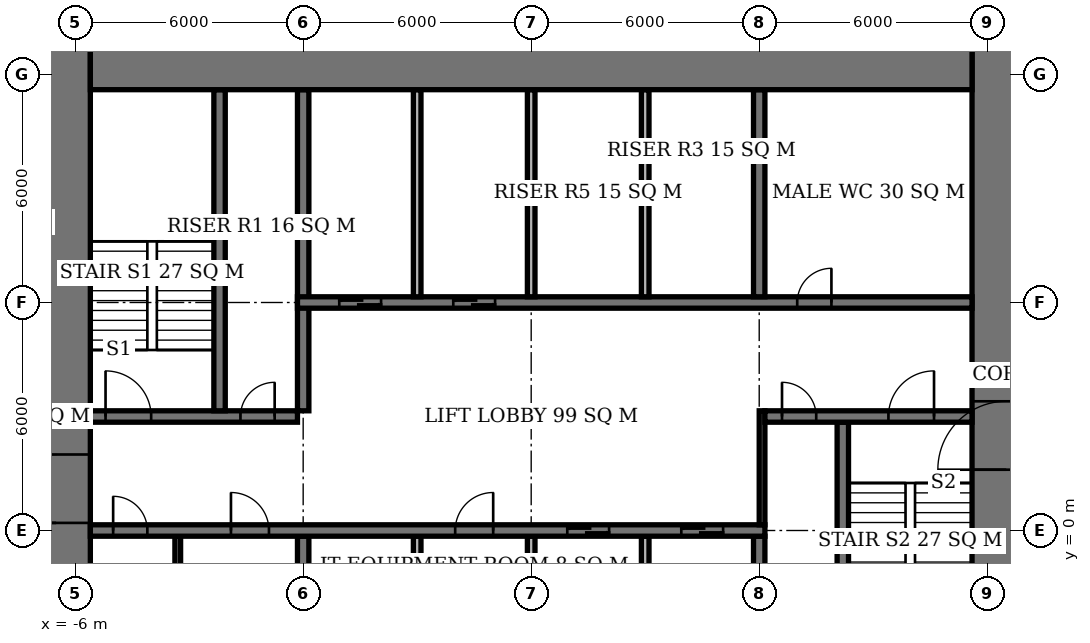
"""IFC4 building model, lengths in metres.
Left out: names, types, materials, properties, quantities, classifications, styles, units other than length and angle.
Written with IfcOpenShell. Run it as: python <this file> out.ifc"""

import sys

from ifc_helpers import new_model, si_unit, direction, frame, frame_2d, origin, place, context, subcontext, project, spatial, rectangle, extrude, element, fill, save


model = new_model("IFC4")
c1 = context("Model", 3, precision=1e-05, world=origin(), true_north=direction((0.0, 1.0)))
c2 = subcontext(c1, "Body", "Model", "MODEL_VIEW")
j1 = project(units=[si_unit("LENGTHUNIT", "METRE"), si_unit("PLANEANGLEUNIT", "RADIAN")], contexts=[c1])
p1 = place(None, origin())
s1 = spatial("IfcSite", under=j1, at=p1, CompositionType="ELEMENT")
p2 = place(p1, origin())
s2 = spatial("IfcBuilding", under=s1, at=p2, CompositionType="ELEMENT")
p3 = place(p2, frame((0.0, 0.0, 268.4)))
s3 = spatial("IfcBuildingStorey", under=s2, at=p3, CompositionType="ELEMENT", Elevation=268.4)
p4 = place(p3, frame((-5.6, 12.6, 0.0), z_axis=(0.0, 0.0, 1.0), x_axis=(1.0, 0.0, 0.0)))
e1 = element("IfcWall", 1, at=p4, inside=s3, PredefinedType="SHEAR", context=c2, shape_type="SweptSolid", body=[
    extrude(rectangle(XDim=23.2, YDim=2.0, at=frame_2d((11.6, 0.0))), origin(), (0.0, 0.0, 1.0), 3.9),
])
p5 = place(p3, frame((-6.5, -7.6, 0.0), z_axis=(0.0, 0.0, 1.0), x_axis=(0.0, 1.0, 0.0)))
e2 = element("IfcWall", 2, at=p5, inside=s3, PredefinedType="SHEAR", context=c2, shape_type="SweptSolid", body=[
    extrude(rectangle(XDim=21.2, YDim=1.8, at=frame_2d((10.6, 0.0))), origin(), (0.0, 0.0, 1.0), 3.9),
])
p6 = place(p5, frame((7.8, 0.0, 0.0)))
e3 = element("IfcOpeningElement", 3, at=p6, cuts=e2, PredefinedType="OPENING", context=c2, shape_type="SweptSolid", body=[
    extrude(rectangle(XDim=1.8, YDim=2.4, at=frame_2d((0.9, 1.2))), frame((0.0, 0.91, 0.0), z_axis=(0.0, -1.0, 0.0), x_axis=(1.0, 0.0, 0.0)), (0.0, 0.0, 1.0), 1.82),
])
p7 = place(p3, frame((18.5, -7.6, 0.0), z_axis=(0.0, 0.0, 1.0), x_axis=(0.0, 1.0, 0.0)))
e4 = element("IfcWall", 4, at=p7, inside=s3, PredefinedType="SHEAR", context=c2, shape_type="SweptSolid", body=[
    extrude(rectangle(XDim=21.2, YDim=1.8, at=frame_2d((10.6, 0.0))), origin(), (0.0, 0.0, 1.0), 3.9),
])
p8 = place(p7, frame((9.2, 0.0, 0.0)))
e5 = element("IfcOpeningElement", 5, at=p8, cuts=e4, PredefinedType="OPENING", context=c2, shape_type="SweptSolid", body=[
    extrude(rectangle(XDim=1.8, YDim=2.4, at=frame_2d((0.9, 1.2))), frame((0.0, 0.91, 0.0), z_axis=(0.0, -1.0, 0.0), x_axis=(1.0, 0.0, 0.0)), (0.0, 0.0, 1.0), 1.82),
])
p9 = place(p3, frame((-5.6, 0.0, 0.0), z_axis=(0.0, 0.0, 1.0), x_axis=(1.0, 0.0, 0.0)))
e6 = element("IfcWall", 6, at=p9, inside=s3, PredefinedType="SHEAR", context=c2, shape_type="SweptSolid", body=[
    extrude(rectangle(XDim=17.75, YDim=0.3, at=frame_2d((8.875, 0.0))), origin(), (0.0, 0.0, 1.0), 3.9),
])
p10 = place(p9, frame((0.6, 0.0, 0.0)))
e7 = element("IfcOpeningElement", 7, at=p10, cuts=e6, PredefinedType="OPENING", context=c2, shape_type="SweptSolid", body=[
    extrude(rectangle(XDim=0.9, YDim=2.1, at=frame_2d((0.45, 1.05))), frame((0.0, 0.16, 0.0), z_axis=(0.0, -1.0, 0.0), x_axis=(1.0, 0.0, 0.0)), (0.0, 0.0, 1.0), 0.32),
])
p11 = place(p9, frame((3.7, 0.0, 0.0)))
e8 = element("IfcOpeningElement", 8, at=p11, cuts=e6, PredefinedType="OPENING", context=c2, shape_type="SweptSolid", body=[
    extrude(rectangle(XDim=1.0, YDim=2.1, at=frame_2d((0.5, 1.05))), frame((0.0, 0.16, 0.0), z_axis=(0.0, -1.0, 0.0), x_axis=(1.0, 0.0, 0.0)), (0.0, 0.0, 1.0), 0.32),
])
p12 = place(p9, frame((9.6, 0.0, 0.0)))
e9 = element("IfcOpeningElement", 9, at=p12, cuts=e6, PredefinedType="OPENING", context=c2, shape_type="SweptSolid", body=[
    extrude(rectangle(XDim=1.0, YDim=2.1, at=frame_2d((0.5, 1.05))), frame((0.0, 0.16, 0.0), z_axis=(0.0, -1.0, 0.0), x_axis=(1.0, 0.0, 0.0)), (0.0, 0.0, 1.0), 0.32),
])
p13 = place(p9, frame((12.55, 0.0, 0.0)))
e10 = element("IfcOpeningElement", 10, at=p13, cuts=e6, PredefinedType="OPENING", context=c2, shape_type="SweptSolid", body=[
    extrude(rectangle(XDim=1.1, YDim=2.1, at=frame_2d((0.55, 1.05))), frame((0.0, 0.16, 0.0), z_axis=(0.0, -1.0, 0.0), x_axis=(1.0, 0.0, 0.0)), (0.0, 0.0, 1.0), 0.32),
])
p14 = place(p9, frame((15.55, 0.0, 0.0)))
e11 = element("IfcOpeningElement", 11, at=p14, cuts=e6, PredefinedType="OPENING", context=c2, shape_type="SweptSolid", body=[
    extrude(rectangle(XDim=1.1, YDim=2.1, at=frame_2d((0.55, 1.05))), frame((0.0, 0.16, 0.0), z_axis=(0.0, -1.0, 0.0), x_axis=(1.0, 0.0, 0.0)), (0.0, 0.0, 1.0), 0.32),
])
p15 = place(p3, frame((-5.6, 3.0, 0.0), z_axis=(0.0, 0.0, 1.0), x_axis=(1.0, 0.0, 0.0)))
e12 = element("IfcWall", 12, at=p15, inside=s3, PredefinedType="SHEAR", context=c2, shape_type="SweptSolid", body=[
    extrude(rectangle(XDim=5.45, YDim=0.3, at=frame_2d((2.725, 0.0))), origin(), (0.0, 0.0, 1.0), 3.9),
])
p16 = place(p15, frame((0.4, 0.0, 0.0)))
e13 = element("IfcOpeningElement", 13, at=p16, cuts=e12, PredefinedType="OPENING", context=c2, shape_type="SweptSolid", body=[
    extrude(rectangle(XDim=1.2, YDim=2.1, at=frame_2d((0.6, 1.05))), frame((0.0, 0.16, 0.0), z_axis=(0.0, -1.0, 0.0), x_axis=(1.0, 0.0, 0.0)), (0.0, 0.0, 1.0), 0.32),
])
p17 = place(p15, frame((3.95, 0.0, 0.0)))
e14 = element("IfcOpeningElement", 14, at=p17, cuts=e12, PredefinedType="OPENING", context=c2, shape_type="SweptSolid", body=[
    extrude(rectangle(XDim=0.9, YDim=2.1, at=frame_2d((0.45, 1.05))), frame((0.0, 0.16, 0.0), z_axis=(0.0, -1.0, 0.0), x_axis=(1.0, 0.0, 0.0)), (0.0, 0.0, 1.0), 0.32),
])
p18 = place(p3, frame((12.15, 3.0, 0.0), z_axis=(0.0, 0.0, 1.0), x_axis=(1.0, 0.0, 0.0)))
e15 = element("IfcWall", 15, at=p18, inside=s3, PredefinedType="SHEAR", context=c2, shape_type="SweptSolid", body=[
    extrude(rectangle(XDim=5.45, YDim=0.3, at=frame_2d((2.725, 0.0))), origin(), (0.0, 0.0, 1.0), 3.9),
])
p19 = place(p18, frame((3.25, 0.0, 0.0)))
e16 = element("IfcOpeningElement", 16, at=p19, cuts=e15, PredefinedType="OPENING", context=c2, shape_type="SweptSolid", body=[
    extrude(rectangle(XDim=1.2, YDim=2.1, at=frame_2d((0.6, 1.05))), frame((0.0, 0.16, 0.0), z_axis=(0.0, -1.0, 0.0), x_axis=(1.0, 0.0, 0.0)), (0.0, 0.0, 1.0), 0.32),
])
p20 = place(p18, frame((0.45, 0.0, 0.0)))
e17 = element("IfcOpeningElement", 17, at=p20, cuts=e15, PredefinedType="OPENING", context=c2, shape_type="SweptSolid", body=[
    extrude(rectangle(XDim=0.9, YDim=2.1, at=frame_2d((0.45, 1.05))), frame((0.0, 0.16, 0.0), z_axis=(0.0, -1.0, 0.0), x_axis=(1.0, 0.0, 0.0)), (0.0, 0.0, 1.0), 0.32),
])
p21 = place(p3, frame((-0.15, 6.0, 0.0), z_axis=(0.0, 0.0, 1.0), x_axis=(1.0, 0.0, 0.0)))
e18 = element("IfcWall", 18, at=p21, inside=s3, PredefinedType="SHEAR", context=c2, shape_type="SweptSolid", body=[
    extrude(rectangle(XDim=17.75, YDim=0.3, at=frame_2d((8.875, 0.0))), origin(), (0.0, 0.0, 1.0), 3.9),
])
p22 = place(p21, frame((13.15, 0.0, 0.0)))
e19 = element("IfcOpeningElement", 19, at=p22, cuts=e18, PredefinedType="OPENING", context=c2, shape_type="SweptSolid", body=[
    extrude(rectangle(XDim=0.9, YDim=2.1, at=frame_2d((0.45, 1.05))), frame((0.0, 0.16, 0.0), z_axis=(0.0, -1.0, 0.0), x_axis=(1.0, 0.0, 0.0)), (0.0, 0.0, 1.0), 0.32),
])
p23 = place(p21, frame((1.1, 0.0, 0.0)))
e20 = element("IfcOpeningElement", 20, at=p23, cuts=e18, PredefinedType="OPENING", context=c2, shape_type="SweptSolid", body=[
    extrude(rectangle(XDim=1.1, YDim=2.1, at=frame_2d((0.55, 1.05))), frame((0.0, 0.16, 0.0), z_axis=(0.0, -1.0, 0.0), x_axis=(1.0, 0.0, 0.0)), (0.0, 0.0, 1.0), 0.32),
])
p24 = place(p21, frame((4.1, 0.0, 0.0)))
e21 = element("IfcOpeningElement", 21, at=p24, cuts=e18, PredefinedType="OPENING", context=c2, shape_type="SweptSolid", body=[
    extrude(rectangle(XDim=1.1, YDim=2.1, at=frame_2d((0.55, 1.05))), frame((0.0, 0.16, 0.0), z_axis=(0.0, -1.0, 0.0), x_axis=(1.0, 0.0, 0.0)), (0.0, 0.0, 1.0), 0.32),
])
p25 = place(p3, frame((0.0, -5.6, 0.0), z_axis=(0.0, 0.0, 1.0), x_axis=(0.0, 1.0, 0.0)))
e22 = element("IfcWall", 22, at=p25, inside=s3, PredefinedType="SHEAR", context=c2, shape_type="SweptSolid", body=[
    extrude(rectangle(XDim=5.45, YDim=0.3, at=frame_2d((2.725, 0.0))), origin(), (0.0, 0.0, 1.0), 3.9),
])
p26 = place(p3, frame((0.0, 3.15, 0.0), z_axis=(0.0, 0.0, 1.0), x_axis=(0.0, 1.0, 0.0)))
e23 = element("IfcWall", 23, at=p26, inside=s3, PredefinedType="SHEAR", context=c2, shape_type="SweptSolid", body=[
    extrude(rectangle(XDim=8.45, YDim=0.3, at=frame_2d((4.225, 0.0))), origin(), (0.0, 0.0, 1.0), 3.9),
])
for number, where, z_axis, x_axis in (
    (24, (12.0, -5.6, 0.0), (0.0, 0.0, 1.0), (0.0, 1.0, 0.0)),
    (25, (12.0, 6.15, 0.0), (0.0, 0.0, 1.0), (0.0, 1.0, 0.0)),
):
    element("IfcWall", number, at=place(p3, frame(where, z_axis=z_axis, x_axis=x_axis)), inside=s3, PredefinedType="SHEAR", context=c2, shape_type="SweptSolid", body=[
        extrude(rectangle(XDim=5.45, YDim=0.3, at=frame_2d((2.725, 0.0))), origin(), (0.0, 0.0, 1.0), 3.9),
    ])
for number, where, z_axis, x_axis in (
    (26, (-2.2, 3.15, 0.0), (0.0, 0.0, 1.0), (0.0, 1.0, 0.0)),
    (27, (14.2, -5.6, 0.0), (0.0, 0.0, 1.0), (0.0, 1.0, 0.0)),
):
    element("IfcWall", number, at=place(p3, frame(where, z_axis=z_axis, x_axis=x_axis)), inside=s3, PredefinedType="SHEAR", context=c2, shape_type="SweptSolid", body=[
        extrude(rectangle(XDim=8.45, YDim=0.3, at=frame_2d((4.225, 0.0))), origin(), (0.0, 0.0, 1.0), 3.9),
    ])
for number, where, z_axis, x_axis in (
    (28, (3.0, 6.15, 0.0), (0.0, 0.0, 1.0), (0.0, 1.0, 0.0)),
    (29, (6.0, 6.15, 0.0), (0.0, 0.0, 1.0), (0.0, 1.0, 0.0)),
    (30, (9.0, 6.15, 0.0), (0.0, 0.0, 1.0), (0.0, 1.0, 0.0)),
    (31, (3.0, -5.6, 0.0), (0.0, 0.0, 1.0), (0.0, 1.0, 0.0)),
    (32, (6.0, -5.6, 0.0), (0.0, 0.0, 1.0), (0.0, 1.0, 0.0)),
    (33, (9.0, -5.6, 0.0), (0.0, 0.0, 1.0), (0.0, 1.0, 0.0)),
):
    element("IfcWall", number, at=place(p3, frame(where, z_axis=z_axis, x_axis=x_axis)), inside=s3, PredefinedType="SOLIDWALL", context=c2, shape_type="SweptSolid", body=[
        extrude(rectangle(XDim=5.45, YDim=0.2, at=frame_2d((2.725, 0.0))), origin(), (0.0, 0.0, 1.0), 3.9),
    ])
p27 = place(p3, frame((-3.3, -5.6, 0.0), z_axis=(0.0, 0.0, 1.0), x_axis=(0.0, 1.0, 0.0)))
e34 = element("IfcWall", 34, at=p27, inside=s3, PredefinedType="PLUMBINGWALL", context=c2, shape_type="SweptSolid", body=[
    extrude(rectangle(XDim=5.45, YDim=0.15, at=frame_2d((2.725, 0.0))), origin(), (0.0, 0.0, 1.0), 3.65),
])
p28 = place(p3, frame((12.075, 0.15, 0.0), z_axis=(0.0, 0.0, 1.0), x_axis=(0.0, 1.0, 0.0)))
e35 = element("IfcWall", 35, at=p28, inside=s3, PredefinedType="PARTITIONING", context=c2, shape_type="SweptSolid", body=[
    extrude(rectangle(XDim=3.0, YDim=0.15, at=frame_2d((1.5, 0.0))), origin(), (0.0, 0.0, 1.0), 3.65),
])
p29 = place(p6, origin())
e36 = element("IfcDoor", 36, at=p29, inside=s3, OperationType="DOUBLE_DOOR_SINGLE_SWING", PredefinedType="DOOR", context=c2, shape_type="SweptSolid", body=[
    extrude(rectangle(XDim=1.8, YDim=2.4, at=frame_2d((0.9, 1.2))), frame((0.0, 0.025, 0.0), z_axis=(0.0, -1.0, 0.0), x_axis=(1.0, 0.0, 0.0)), (0.0, 0.0, 1.0), 0.05),
])
fill(e3, e36)
p30 = place(p8, origin())
e37 = element("IfcDoor", 37, at=p30, inside=s3, OperationType="DOUBLE_DOOR_SINGLE_SWING", PredefinedType="DOOR", context=c2, shape_type="SweptSolid", body=[
    extrude(rectangle(XDim=1.8, YDim=2.4, at=frame_2d((0.9, 1.2))), frame((0.0, 0.025, 0.0), z_axis=(0.0, -1.0, 0.0), x_axis=(1.0, 0.0, 0.0)), (0.0, 0.0, 1.0), 0.05),
])
fill(e5, e37)
p31 = place(p16, origin())
e38 = element("IfcDoor", 38, at=p31, inside=s3, OperationType="SINGLE_SWING_LEFT", PredefinedType="DOOR", context=c2, shape_type="SweptSolid", body=[
    extrude(rectangle(XDim=1.2, YDim=2.1, at=frame_2d((0.6, 1.05))), frame((0.0, 0.025, 0.0), z_axis=(0.0, -1.0, 0.0), x_axis=(1.0, 0.0, 0.0)), (0.0, 0.0, 1.0), 0.05),
])
fill(e13, e38)
p32 = place(p17, origin())
e39 = element("IfcDoor", 39, at=p32, inside=s3, OperationType="SINGLE_SWING_RIGHT", PredefinedType="DOOR", context=c2, shape_type="SweptSolid", body=[
    extrude(rectangle(XDim=0.9, YDim=2.1, at=frame_2d((0.45, 1.05))), frame((0.0, 0.025, 0.0), z_axis=(0.0, -1.0, 0.0), x_axis=(1.0, 0.0, 0.0)), (0.0, 0.0, 1.0), 0.05),
])
fill(e14, e39)
p33 = place(p19, origin())
e40 = element("IfcDoor", 40, at=p33, inside=s3, OperationType="SINGLE_SWING_RIGHT", PredefinedType="DOOR", context=c2, shape_type="SweptSolid", body=[
    extrude(rectangle(XDim=1.2, YDim=2.1, at=frame_2d((0.6, 1.05))), frame((0.0, 0.025, 0.0), z_axis=(0.0, -1.0, 0.0), x_axis=(1.0, 0.0, 0.0)), (0.0, 0.0, 1.0), 0.05),
])
fill(e16, e40)
p34 = place(p20, origin())
e41 = element("IfcDoor", 41, at=p34, inside=s3, OperationType="SINGLE_SWING_LEFT", PredefinedType="DOOR", context=c2, shape_type="SweptSolid", body=[
    extrude(rectangle(XDim=0.9, YDim=2.1, at=frame_2d((0.45, 1.05))), frame((0.0, 0.025, 0.0), z_axis=(0.0, -1.0, 0.0), x_axis=(1.0, 0.0, 0.0)), (0.0, 0.0, 1.0), 0.05),
])
fill(e17, e41)
p35 = place(p10, origin())
e42 = element("IfcDoor", 42, at=p35, inside=s3, OperationType="SINGLE_SWING_LEFT", PredefinedType="DOOR", context=c2, shape_type="SweptSolid", body=[
    extrude(rectangle(XDim=0.9, YDim=2.1, at=frame_2d((0.45, 1.05))), frame((0.0, 0.025, 0.0), z_axis=(0.0, -1.0, 0.0), x_axis=(1.0, 0.0, 0.0)), (0.0, 0.0, 1.0), 0.05),
])
fill(e7, e42)
p36 = place(p11, origin())
e43 = element("IfcDoor", 43, at=p36, inside=s3, OperationType="SINGLE_SWING_LEFT", PredefinedType="DOOR", context=c2, shape_type="SweptSolid", body=[
    extrude(rectangle(XDim=1.0, YDim=2.1, at=frame_2d((0.5, 1.05))), frame((0.0, 0.025, 0.0), z_axis=(0.0, -1.0, 0.0), x_axis=(1.0, 0.0, 0.0)), (0.0, 0.0, 1.0), 0.05),
])
fill(e8, e43)
p37 = place(p22, origin())
e44 = element("IfcDoor", 44, at=p37, inside=s3, OperationType="SINGLE_SWING_RIGHT", PredefinedType="DOOR", context=c2, shape_type="SweptSolid", body=[
    extrude(rectangle(XDim=0.9, YDim=2.1, at=frame_2d((0.45, 1.05))), frame((0.0, 0.025, 0.0), z_axis=(0.0, -1.0, 0.0), x_axis=(1.0, 0.0, 0.0)), (0.0, 0.0, 1.0), 0.05),
])
fill(e19, e44)
p38 = place(p12, origin())
e45 = element("IfcDoor", 45, at=p38, inside=s3, OperationType="SINGLE_SWING_RIGHT", PredefinedType="DOOR", context=c2, shape_type="SweptSolid", body=[
    extrude(rectangle(XDim=1.0, YDim=2.1, at=frame_2d((0.5, 1.05))), frame((0.0, 0.025, 0.0), z_axis=(0.0, -1.0, 0.0), x_axis=(1.0, 0.0, 0.0)), (0.0, 0.0, 1.0), 0.05),
])
fill(e9, e45)
p39 = place(p23, origin())
e46 = element("IfcDoor", 46, at=p39, inside=s3, OperationType="DOUBLE_DOOR_SLIDING", PredefinedType="USERDEFINED", context=c2, shape_type="SweptSolid", body=[
    extrude(rectangle(XDim=1.1, YDim=2.1, at=frame_2d((0.55, 1.05))), frame((0.0, 0.025, 0.0), z_axis=(0.0, -1.0, 0.0), x_axis=(1.0, 0.0, 0.0)), (0.0, 0.0, 1.0), 0.05),
])
fill(e20, e46)
p40 = place(p24, origin())
e47 = element("IfcDoor", 47, at=p40, inside=s3, OperationType="DOUBLE_DOOR_SLIDING", PredefinedType="USERDEFINED", context=c2, shape_type="SweptSolid", body=[
    extrude(rectangle(XDim=1.1, YDim=2.1, at=frame_2d((0.55, 1.05))), frame((0.0, 0.025, 0.0), z_axis=(0.0, -1.0, 0.0), x_axis=(1.0, 0.0, 0.0)), (0.0, 0.0, 1.0), 0.05),
])
fill(e21, e47)
p41 = place(p13, origin())
e48 = element("IfcDoor", 48, at=p41, inside=s3, OperationType="DOUBLE_DOOR_SLIDING", PredefinedType="USERDEFINED", context=c2, shape_type="SweptSolid", body=[
    extrude(rectangle(XDim=1.1, YDim=2.1, at=frame_2d((0.55, 1.05))), frame((0.0, 0.025, 0.0), z_axis=(0.0, -1.0, 0.0), x_axis=(1.0, 0.0, 0.0)), (0.0, 0.0, 1.0), 0.05),
])
fill(e10, e48)
p42 = place(p14, origin())
e49 = element("IfcDoor", 49, at=p42, inside=s3, OperationType="DOUBLE_DOOR_SLIDING", PredefinedType="USERDEFINED", context=c2, shape_type="SweptSolid", body=[
    extrude(rectangle(XDim=1.1, YDim=2.1, at=frame_2d((0.55, 1.05))), frame((0.0, 0.025, 0.0), z_axis=(0.0, -1.0, 0.0), x_axis=(1.0, 0.0, 0.0)), (0.0, 0.0, 1.0), 0.05),
])
fill(e11, e49)
save(model, sys.argv[1])
